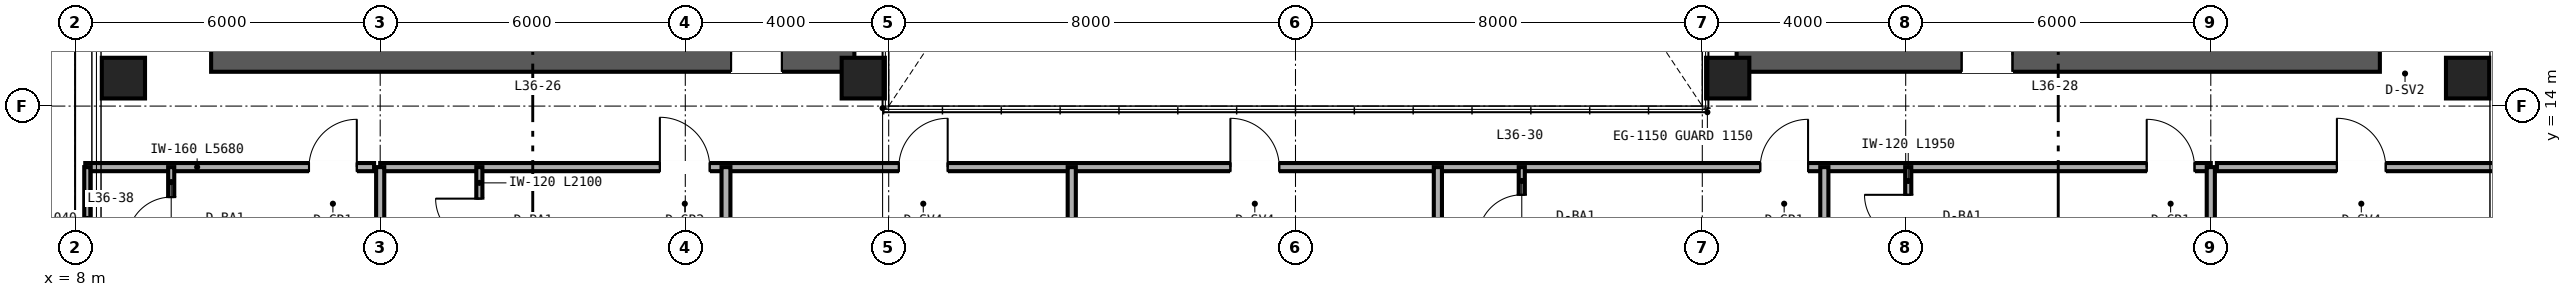
"""IFC4 building model, lengths in metres.
Left out: names, types, materials, properties, quantities, classifications, styles, units other than length and angle.
Written with IfcOpenShell. Run it as: python <this file> out.ifc"""

import sys

from ifc_helpers import new_model, si_unit, direction, frame, frame_2d, origin, origin_2d, place, context, subcontext, project, spatial, rectangle, hollow_rectangle, extrude, source, transform, mapped, element, fill, save


model = new_model("IFC4")
c1 = context("Model", 3, precision=1e-05, world=origin(), true_north=direction((0.0, 1.0)))
c2 = subcontext(c1, "Body", "Model", "MODEL_VIEW")
j1 = project(units=[si_unit("LENGTHUNIT", "METRE"), si_unit("PLANEANGLEUNIT", "RADIAN")], contexts=[c1])
p1 = place(None, origin())
s1 = spatial("IfcSite", under=j1, at=p1, CompositionType="ELEMENT")
p2 = place(p1, origin())
s2 = spatial("IfcBuilding", under=s1, at=p2, CompositionType="ELEMENT")
p3 = place(p2, frame((0.0, 0.0, 144.0)))
s3 = spatial("IfcBuildingStorey", under=s2, at=p3, CompositionType="ELEMENT", Elevation=144.0)
p4 = place(p3, frame((10.675, 15.0, 0.0), z_axis=(0.0, 0.0, 1.0), x_axis=(1.0, 0.0, 0.0)))
e1 = element("IfcWall", 1, at=p4, inside=s3, PredefinedType="SHEAR", context=c2, shape_type="SweptSolid", body=[
    extrude(rectangle(XDim=12.65, YDim=0.65, at=frame_2d((6.325, 0.0))), origin(), (0.0, 0.0, 1.0), 3.36),
])
p5 = place(p4, frame((10.225, 0.0, 0.0)))
e2 = element("IfcOpeningElement", 2, at=p5, cuts=e1, PredefinedType="OPENING", context=c2, shape_type="SweptSolid", body=[
    extrude(rectangle(XDim=1.0, YDim=2.15, at=frame_2d((0.5, 1.075))), frame((0.0, 0.335, 0.0), z_axis=(0.0, -1.0, 0.0), x_axis=(1.0, 0.0, 0.0)), (0.0, 0.0, 1.0), 0.67),
])
p6 = place(p3, frame((40.675, 15.0, 0.0), z_axis=(0.0, 0.0, 1.0), x_axis=(1.0, 0.0, 0.0)))
e3 = element("IfcWall", 3, at=p6, inside=s3, PredefinedType="SHEAR", context=c2, shape_type="SweptSolid", body=[
    extrude(rectangle(XDim=12.65, YDim=0.65, at=frame_2d((6.325, 0.0))), origin(), (0.0, 0.0, 1.0), 3.36),
])
p7 = place(p6, frame((4.425, 0.0, 0.0)))
e4 = element("IfcOpeningElement", 4, at=p7, cuts=e3, PredefinedType="OPENING", context=c2, shape_type="SweptSolid", body=[
    extrude(rectangle(XDim=1.0, YDim=2.15, at=frame_2d((0.5, 1.075))), frame((0.0, 0.335, 0.0), z_axis=(0.0, -1.0, 0.0), x_axis=(1.0, 0.0, 0.0)), (0.0, 0.0, 1.0), 0.67),
])
m1 = source(origin(), c2, "Body", "SweptSolid", [
    extrude(hollow_rectangle(XDim=0.85, YDim=0.8, WallThickness=0.032, at=origin_2d()), origin(), (0.0, 0.0, 1.0), 3.36),
])
for number, where, z_axis, x_axis in (
    (5, (8.95, 14.55, 0.0), (0.0, 0.0, 1.0), (1.0, 0.0, 0.0)),
    (6, (23.5, 14.55, 0.0), (0.0, 0.0, 1.0), (1.0, 0.0, 0.0)),
    (7, (40.5, 14.55, 0.0), (0.0, 0.0, 1.0), (1.0, 0.0, 0.0)),
    (8, (55.05, 14.55, 0.0), (0.0, 0.0, 1.0), (1.0, 0.0, 0.0)),
):
    element("IfcColumn", number, at=place(p3, frame(where, z_axis=z_axis, x_axis=x_axis)), inside=s3, PredefinedType="COLUMN", context=c2, shape_type="MappedRepresentation", body=[
        mapped(m1, transform((0.0, 0.0, 0.0), scale=1.0)),
    ])
p8 = place(p3, frame((8.2, 12.8, 0.0), z_axis=(0.0, 0.0, 1.0), x_axis=(1.0, 0.0, 0.0)))
e9 = element("IfcWall", 9, at=p8, inside=s3, PredefinedType="PARTITIONING", context=c2, shape_type="SweptSolid", body=[
    extrude(rectangle(XDim=5.68, YDim=0.16, at=frame_2d((2.84, 0.0))), origin(), (0.0, 0.0, 1.0), 3.36),
])
p9 = place(p8, frame((4.4, 0.0, 0.0)))
e10 = element("IfcOpeningElement", 10, at=p9, cuts=e9, PredefinedType="OPENING", context=c2, shape_type="SweptSolid", body=[
    extrude(rectangle(XDim=0.94, YDim=2.15, at=frame_2d((0.47, 1.075))), frame((0.0, 0.09, 0.0), z_axis=(0.0, -1.0, 0.0), x_axis=(1.0, 0.0, 0.0)), (0.0, 0.0, 1.0), 0.18),
])
p10 = place(p3, frame((9.89, 10.76, 0.0), z_axis=(0.0, 0.0, 1.0), x_axis=(0.0, 1.0, 0.0)))
e11 = element("IfcWall", 11, at=p10, inside=s3, PredefinedType="PARTITIONING", context=c2, shape_type="SweptSolid", body=[
    extrude(rectangle(XDim=2.04, YDim=0.12, at=frame_2d((1.02, 0.0))), origin(), (0.0, 0.0, 1.0), 3.36),
])
p11 = place(p10, frame((0.59, 0.0, 0.0)))
e12 = element("IfcOpeningElement", 12, at=p11, cuts=e11, PredefinedType="OPENING", context=c2, shape_type="SweptSolid", body=[
    extrude(rectangle(XDim=0.86, YDim=2.1, at=frame_2d((0.43, 1.05))), frame((0.0, 0.07, 0.0), z_axis=(0.0, -1.0, 0.0), x_axis=(1.0, 0.0, 0.0)), (0.0, 0.0, 1.0), 0.14),
])
p12 = place(p3, frame((8.24, 10.76, 0.0), z_axis=(0.0, 0.0, 1.0), x_axis=(0.0, 1.0, 0.0)))
e13 = element("IfcWall", 13, at=p12, inside=s3, PredefinedType="PARTITIONING", context=c2, shape_type="SweptSolid", body=[
    extrude(rectangle(XDim=2.04, YDim=0.12, at=frame_2d((1.02, 0.0))), origin(), (0.0, 0.0, 1.0), 3.36),
])
p13 = place(p3, frame((50.12, 12.8, 0.0), z_axis=(0.0, 0.0, 1.0), x_axis=(1.0, 0.0, 0.0)))
e14 = element("IfcWall", 14, at=p13, inside=s3, PredefinedType="PARTITIONING", context=c2, shape_type="SweptSolid", body=[
    extrude(rectangle(XDim=5.68, YDim=0.16, at=frame_2d((2.84, 0.0))), origin(), (0.0, 0.0, 1.0), 3.36),
])
p14 = place(p13, frame((2.36, 0.0, 0.0)))
e15 = element("IfcOpeningElement", 15, at=p14, cuts=e14, PredefinedType="OPENING", context=c2, shape_type="SweptSolid", body=[
    extrude(rectangle(XDim=0.96, YDim=2.15, at=frame_2d((0.48, 1.075))), frame((0.0, 0.09, 0.0), z_axis=(0.0, -1.0, 0.0), x_axis=(1.0, 0.0, 0.0)), (0.0, 0.0, 1.0), 0.18),
])
p15 = place(p3, frame((14.0, 12.8, 0.0), z_axis=(0.0, 0.0, 1.0), x_axis=(1.0, 0.0, 0.0)))
e16 = element("IfcWall", 16, at=p15, inside=s3, PredefinedType="PARTITIONING", context=c2, shape_type="SweptSolid", body=[
    extrude(rectangle(XDim=36.0, YDim=0.16, at=frame_2d((18.0, 0.0))), origin(), (0.0, 0.0, 1.0), 2.581),
])
p16 = place(p15, frame((5.5, 0.0, 0.0)))
e17 = element("IfcOpeningElement", 17, at=p16, cuts=e16, PredefinedType="OPENING", context=c2, shape_type="SweptSolid", body=[
    extrude(rectangle(XDim=0.98, YDim=2.2, at=frame_2d((0.49, 1.1))), frame((0.0, 0.09, 0.0), z_axis=(0.0, -1.0, 0.0), x_axis=(1.0, 0.0, 0.0)), (0.0, 0.0, 1.0), 0.18),
])
p17 = place(p15, frame((10.2, 0.0, 0.0)))
e18 = element("IfcOpeningElement", 18, at=p17, cuts=e16, PredefinedType="OPENING", context=c2, shape_type="SweptSolid", body=[
    extrude(rectangle(XDim=0.96, YDim=2.15, at=frame_2d((0.48, 1.075))), frame((0.0, 0.09, 0.0), z_axis=(0.0, -1.0, 0.0), x_axis=(1.0, 0.0, 0.0)), (0.0, 0.0, 1.0), 0.18),
])
p18 = place(p15, frame((16.72, 0.0, 0.0)))
e19 = element("IfcOpeningElement", 19, at=p18, cuts=e16, PredefinedType="OPENING", context=c2, shape_type="SweptSolid", body=[
    extrude(rectangle(XDim=0.96, YDim=2.15, at=frame_2d((0.48, 1.075))), frame((0.0, 0.09, 0.0), z_axis=(0.0, -1.0, 0.0), x_axis=(1.0, 0.0, 0.0)), (0.0, 0.0, 1.0), 0.18),
])
p19 = place(p15, frame((27.14, 0.0, 0.0)))
e20 = element("IfcOpeningElement", 20, at=p19, cuts=e16, PredefinedType="OPENING", context=c2, shape_type="SweptSolid", body=[
    extrude(rectangle(XDim=0.94, YDim=2.15, at=frame_2d((0.47, 1.075))), frame((0.0, 0.09, 0.0), z_axis=(0.0, -1.0, 0.0), x_axis=(1.0, 0.0, 0.0)), (0.0, 0.0, 1.0), 0.18),
])
p20 = place(p15, frame((34.74, 0.0, 0.0)))
e21 = element("IfcOpeningElement", 21, at=p20, cuts=e16, PredefinedType="OPENING", context=c2, shape_type="SweptSolid", body=[
    extrude(rectangle(XDim=0.94, YDim=2.15, at=frame_2d((0.47, 1.075))), frame((0.0, 0.09, 0.0), z_axis=(0.0, -1.0, 0.0), x_axis=(1.0, 0.0, 0.0)), (0.0, 0.0, 1.0), 0.18),
])
for number, where, z_axis, x_axis in (
    (22, (14.0, 2.36, 0.0), (0.0, 0.0, 1.0), (0.0, 1.0, 0.0)),
    (23, (50.0, 2.36, 0.0), (0.0, 0.0, 1.0), (0.0, 1.0, 0.0)),
):
    element("IfcWall", number, at=place(p3, frame(where, z_axis=z_axis, x_axis=x_axis)), inside=s3, PredefinedType="PARTITIONING", context=c2, shape_type="SweptSolid", body=[
        extrude(rectangle(XDim=10.44, YDim=0.16, at=frame_2d((5.22, 0.0))), origin(), (0.0, 0.0, 1.0), 2.667),
    ])
p21 = place(p3, frame((20.8, 2.36, 0.0), z_axis=(0.0, 0.0, 1.0), x_axis=(0.0, 1.0, 0.0)))
e24 = element("IfcWall", 24, at=p21, inside=s3, PredefinedType="PARTITIONING", context=c2, shape_type="SweptSolid", body=[
    extrude(rectangle(XDim=10.44, YDim=0.175, at=frame_2d((5.22, 0.0))), origin(), (0.0, 0.0, 1.0), 2.823),
])
p22 = place(p3, frame((15.95, 10.7, 0.0), z_axis=(0.0, 0.0, 1.0), x_axis=(0.0, 1.0, 0.0)))
e25 = element("IfcWall", 25, at=p22, inside=s3, PredefinedType="PARTITIONING", context=c2, shape_type="SweptSolid", body=[
    extrude(rectangle(XDim=2.1, YDim=0.12, at=frame_2d((1.05, 0.0))), origin(), (0.0, 0.0, 1.0), 3.36),
])
p23 = place(p22, frame((0.62, 0.0, 0.0)))
e26 = element("IfcOpeningElement", 26, at=p23, cuts=e25, PredefinedType="OPENING", context=c2, shape_type="SweptSolid", body=[
    extrude(rectangle(XDim=0.86, YDim=2.1, at=frame_2d((0.43, 1.05))), frame((0.0, 0.07, 0.0), z_axis=(0.0, -1.0, 0.0), x_axis=(1.0, 0.0, 0.0)), (0.0, 0.0, 1.0), 0.14),
])
for number, where, z_axis, x_axis in (
    (27, (27.6, 2.36, 0.0), (0.0, 0.0, 1.0), (0.0, 1.0, 0.0)),
    (28, (34.8, 2.36, 0.0), (0.0, 0.0, 1.0), (0.0, 1.0, 0.0)),
):
    element("IfcWall", number, at=place(p3, frame(where, z_axis=z_axis, x_axis=x_axis)), inside=s3, PredefinedType="PARTITIONING", context=c2, shape_type="SweptSolid", body=[
        extrude(rectangle(XDim=10.44, YDim=0.16, at=frame_2d((5.22, 0.0))), origin(), (0.0, 0.0, 1.0), 2.433),
    ])
p24 = place(p3, frame((42.4, 2.36, 0.0), z_axis=(0.0, 0.0, 1.0), x_axis=(0.0, 1.0, 0.0)))
e29 = element("IfcWall", 29, at=p24, inside=s3, PredefinedType="PARTITIONING", context=c2, shape_type="SweptSolid", body=[
    extrude(rectangle(XDim=10.44, YDim=0.16, at=frame_2d((5.22, 0.0))), origin(), (0.0, 0.0, 1.0), 2.823),
])
p25 = place(p3, frame((36.45, 10.85, 0.0), z_axis=(0.0, 0.0, 1.0), x_axis=(0.0, 1.0, 0.0)))
e30 = element("IfcWall", 30, at=p25, inside=s3, PredefinedType="PARTITIONING", context=c2, shape_type="SweptSolid", body=[
    extrude(rectangle(XDim=1.95, YDim=0.12, at=frame_2d((0.975, 0.0))), origin(), (0.0, 0.0, 1.0), 3.36),
])
p26 = place(p25, frame((0.545, 0.0, 0.0)))
e31 = element("IfcOpeningElement", 31, at=p26, cuts=e30, PredefinedType="OPENING", context=c2, shape_type="SweptSolid", body=[
    extrude(rectangle(XDim=0.86, YDim=2.1, at=frame_2d((0.43, 1.05))), frame((0.0, 0.07, 0.0), z_axis=(0.0, -1.0, 0.0), x_axis=(1.0, 0.0, 0.0)), (0.0, 0.0, 1.0), 0.14),
])
p27 = place(p3, frame((44.05, 10.85, 0.0), z_axis=(0.0, 0.0, 1.0), x_axis=(0.0, 1.0, 0.0)))
e32 = element("IfcWall", 32, at=p27, inside=s3, PredefinedType="PARTITIONING", context=c2, shape_type="SweptSolid", body=[
    extrude(rectangle(XDim=1.95, YDim=0.12, at=frame_2d((0.975, 0.0))), origin(), (0.0, 0.0, 1.0), 3.36),
])
p28 = place(p27, frame((0.545, 0.0, 0.0)))
e33 = element("IfcOpeningElement", 33, at=p28, cuts=e32, PredefinedType="OPENING", context=c2, shape_type="SweptSolid", body=[
    extrude(rectangle(XDim=0.86, YDim=2.1, at=frame_2d((0.43, 1.05))), frame((0.0, 0.07, 0.0), z_axis=(0.0, -1.0, 0.0), x_axis=(1.0, 0.0, 0.0)), (0.0, 0.0, 1.0), 0.14),
])
m2 = source(origin(), c2, "Body", "SweptSolid", [
    extrude(rectangle(XDim=1.0, YDim=2.15, at=frame_2d((0.5, 1.075))), frame((0.0, 0.025, 0.0), z_axis=(0.0, -1.0, 0.0), x_axis=(1.0, 0.0, 0.0)), (0.0, 0.0, 1.0), 0.05),
])
p29 = place(p5, origin())
e34 = element("IfcDoor", 34, at=p29, inside=s3, OperationType="SINGLE_SWING_LEFT", PredefinedType="DOOR", context=c2, shape_type="MappedRepresentation", body=[
    mapped(m2, transform((0.0, 0.0, 0.0), scale=1.0)),
])
fill(e2, e34)
p30 = place(p7, origin())
e35 = element("IfcDoor", 35, at=p30, inside=s3, OperationType="SINGLE_SWING_RIGHT", PredefinedType="DOOR", context=c2, shape_type="MappedRepresentation", body=[
    mapped(m2, transform((0.0, 0.0, 0.0), scale=1.0)),
])
fill(e4, e35)
m3 = source(origin(), c2, "Body", "SweptSolid", [
    extrude(rectangle(XDim=0.86, YDim=2.1, at=frame_2d((0.43, 1.05))), frame((0.0, 0.025, 0.0), z_axis=(0.0, -1.0, 0.0), x_axis=(1.0, 0.0, 0.0)), (0.0, 0.0, 1.0), 0.05),
])
p31 = place(p11, origin())
e36 = element("IfcDoor", 36, at=p31, inside=s3, OperationType="SINGLE_SWING_LEFT", PredefinedType="DOOR", context=c2, shape_type="MappedRepresentation", body=[
    mapped(m3, transform((0.0, 0.0, 0.0), scale=1.0)),
])
fill(e12, e36)
m4 = source(origin(), c2, "Body", "SweptSolid", [
    extrude(rectangle(XDim=0.94, YDim=2.15, at=frame_2d((0.47, 1.075))), frame((0.0, 0.025, 0.0), z_axis=(0.0, -1.0, 0.0), x_axis=(1.0, 0.0, 0.0)), (0.0, 0.0, 1.0), 0.05),
])
p32 = place(p9, origin())
e37 = element("IfcDoor", 37, at=p32, inside=s3, OperationType="SINGLE_SWING_RIGHT", PredefinedType="DOOR", context=c2, shape_type="MappedRepresentation", body=[
    mapped(m4, transform((0.0, 0.0, 0.0), scale=1.0)),
])
fill(e10, e37)
m5 = source(origin(), c2, "Body", "SweptSolid", [
    extrude(rectangle(XDim=0.96, YDim=2.15, at=frame_2d((0.48, 1.075))), frame((0.0, 0.025, 0.0), z_axis=(0.0, -1.0, 0.0), x_axis=(1.0, 0.0, 0.0)), (0.0, 0.0, 1.0), 0.05),
])
p33 = place(p14, origin())
e38 = element("IfcDoor", 38, at=p33, inside=s3, OperationType="SINGLE_SWING_LEFT", PredefinedType="DOOR", context=c2, shape_type="MappedRepresentation", body=[
    mapped(m5, transform((0.0, 0.0, 0.0), scale=1.0)),
])
fill(e15, e38)
p34 = place(p23, origin())
e39 = element("IfcDoor", 39, at=p34, inside=s3, OperationType="SINGLE_SWING_RIGHT", PredefinedType="DOOR", context=c2, shape_type="MappedRepresentation", body=[
    mapped(m3, transform((0.0, 0.0, 0.0), scale=1.0)),
])
fill(e26, e39)
p35 = place(p26, origin())
e40 = element("IfcDoor", 40, at=p35, inside=s3, OperationType="SINGLE_SWING_LEFT", PredefinedType="DOOR", context=c2, shape_type="MappedRepresentation", body=[
    mapped(m3, transform((0.0, 0.0, 0.0), scale=1.0)),
])
fill(e31, e40)
p36 = place(p28, origin())
e41 = element("IfcDoor", 41, at=p36, inside=s3, OperationType="SINGLE_SWING_RIGHT", PredefinedType="DOOR", context=c2, shape_type="MappedRepresentation", body=[
    mapped(m3, transform((0.0, 0.0, 0.0), scale=1.0)),
])
fill(e33, e41)
m6 = source(origin(), c2, "Body", "SweptSolid", [
    extrude(rectangle(XDim=0.98, YDim=2.2, at=frame_2d((0.49, 1.1))), frame((0.0, 0.025, 0.0), z_axis=(0.0, -1.0, 0.0), x_axis=(1.0, 0.0, 0.0)), (0.0, 0.0, 1.0), 0.05),
])
p37 = place(p16, origin())
e42 = element("IfcDoor", 42, at=p37, inside=s3, OperationType="SINGLE_SWING_LEFT", PredefinedType="DOOR", context=c2, shape_type="MappedRepresentation", body=[
    mapped(m6, transform((0.0, 0.0, 0.0), scale=1.0)),
])
fill(e17, e42)
p38 = place(p17, origin())
e43 = element("IfcDoor", 43, at=p38, inside=s3, OperationType="SINGLE_SWING_RIGHT", PredefinedType="DOOR", context=c2, shape_type="MappedRepresentation", body=[
    mapped(m5, transform((0.0, 0.0, 0.0), scale=1.0)),
])
fill(e18, e43)
p39 = place(p18, origin())
e44 = element("IfcDoor", 44, at=p39, inside=s3, OperationType="SINGLE_SWING_LEFT", PredefinedType="DOOR", context=c2, shape_type="MappedRepresentation", body=[
    mapped(m5, transform((0.0, 0.0, 0.0), scale=1.0)),
])
fill(e19, e44)
p40 = place(p19, origin())
e45 = element("IfcDoor", 45, at=p40, inside=s3, OperationType="SINGLE_SWING_RIGHT", PredefinedType="DOOR", context=c2, shape_type="MappedRepresentation", body=[
    mapped(m4, transform((0.0, 0.0, 0.0), scale=1.0)),
])
fill(e20, e45)
p41 = place(p20, origin())
e46 = element("IfcDoor", 46, at=p41, inside=s3, OperationType="SINGLE_SWING_LEFT", PredefinedType="DOOR", context=c2, shape_type="MappedRepresentation", body=[
    mapped(m4, transform((0.0, 0.0, 0.0), scale=1.0)),
])
fill(e21, e46)
save(model, sys.argv[1])
